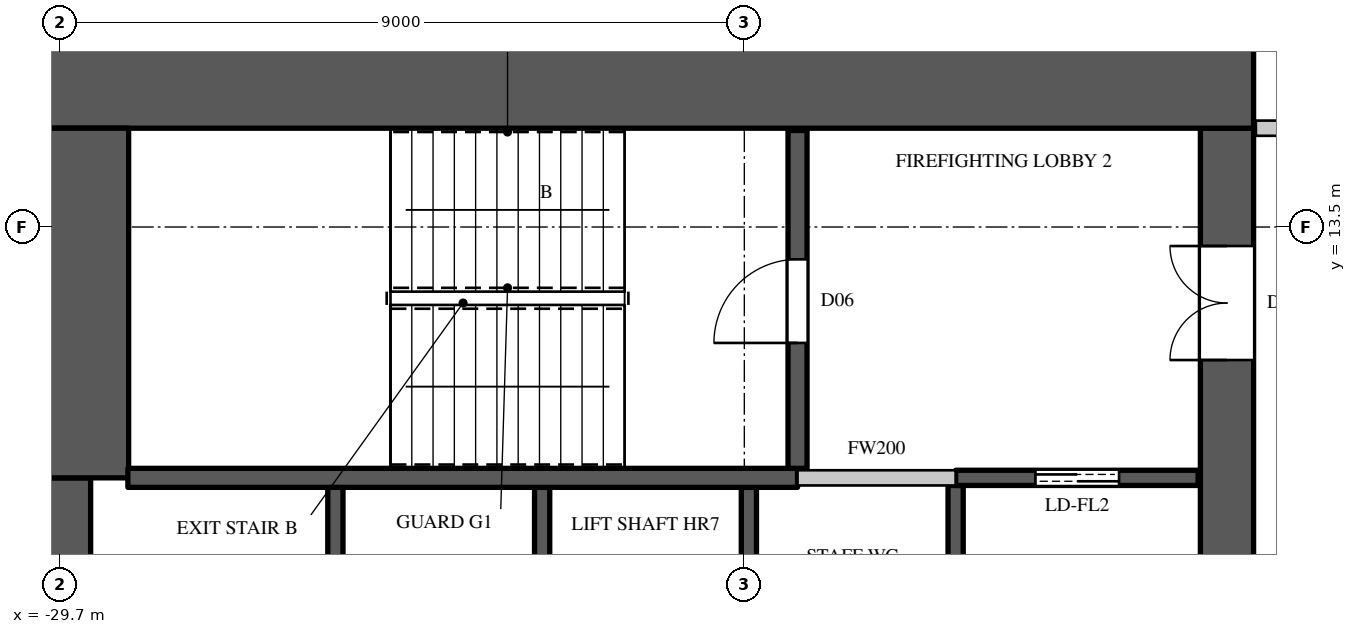
"""IFC4 building model, lengths in metres.
Left out: names, types, materials, properties, quantities, classifications, styles, units other than length and angle.
Written with IfcOpenShell. Run it as: python <this file> out.ifc"""

import sys

from ifc_helpers import new_model, si_unit, direction, frame, frame_2d, origin, place, context, subcontext, project, spatial, rectangle, extrude, element, fill, save


model = new_model("IFC4")
c1 = context("Model", 3, precision=1e-05, world=origin(), true_north=direction((0.0, 1.0)))
c2 = subcontext(c1, "Body", "Model", "MODEL_VIEW")
j1 = project(units=[si_unit("LENGTHUNIT", "METRE"), si_unit("PLANEANGLEUNIT", "RADIAN")], contexts=[c1])
p1 = place(None, origin())
s1 = spatial("IfcSite", under=j1, at=p1, CompositionType="ELEMENT")
p2 = place(p1, origin())
s2 = spatial("IfcBuilding", under=s1, at=p2, CompositionType="ELEMENT")
p3 = place(p2, frame((0.0, 0.0, 296.7)))
s3 = spatial("IfcBuildingStorey", under=s2, at=p3, CompositionType="ELEMENT", Elevation=296.7)
p4 = place(p3, frame((-30.0, 15.4, 0.0), z_axis=(0.0, 0.0, 1.0), x_axis=(1.0, 0.0, 0.0)))
e1 = element("IfcWall", 1, at=p4, inside=s3, PredefinedType="SHEAR", context=c2, shape_type="SweptSolid", body=[
    extrude(rectangle(XDim=16.0, YDim=1.2, at=frame_2d((8.0, 0.0))), origin(), (0.0, 0.0, 1.0), 4.1),
])
p5 = place(p3, frame((-14.35, -14.8, 0.0), z_axis=(0.0, 0.0, 1.0), x_axis=(0.0, 1.0, 0.0)))
e2 = element("IfcWall", 2, at=p5, inside=s3, PredefinedType="SHEAR", context=c2, shape_type="SweptSolid", body=[
    extrude(rectangle(XDim=29.6, YDim=0.7, at=frame_2d((14.8, 0.0))), origin(), (0.0, 0.0, 1.0), 4.1),
])
p6 = place(p5, frame((1.55, 0.0, 0.0)))
e3 = element("IfcOpeningElement", 3, at=p6, cuts=e2, PredefinedType="OPENING", context=c2, shape_type="SweptSolid", body=[
    extrude(rectangle(XDim=1.5, YDim=2.4, at=frame_2d((0.75, 1.2))), frame((0.0, 0.36, 0.0), z_axis=(0.0, -1.0, 0.0), x_axis=(1.0, 0.0, 0.0)), (0.0, 0.0, 1.0), 0.72),
])
p7 = place(p5, frame((26.55, 0.0, 0.0)))
e4 = element("IfcOpeningElement", 4, at=p7, cuts=e2, PredefinedType="OPENING", context=c2, shape_type="SweptSolid", body=[
    extrude(rectangle(XDim=1.5, YDim=2.4, at=frame_2d((0.75, 1.2))), frame((0.0, 0.36, 0.0), z_axis=(0.0, -1.0, 0.0), x_axis=(1.0, 0.0, 0.0)), (0.0, 0.0, 1.0), 0.72),
])
p8 = place(p5, frame((8.45, 0.0, 0.0)))
e5 = element("IfcOpeningElement", 5, at=p8, cuts=e2, PredefinedType="OPENING", context=c2, shape_type="SweptSolid", body=[
    extrude(rectangle(XDim=1.5, YDim=2.4, at=frame_2d((0.75, 1.2))), frame((0.0, 0.36, 0.0), z_axis=(0.0, -1.0, 0.0), x_axis=(1.0, 0.0, 0.0)), (0.0, 0.0, 1.0), 0.72),
])
p9 = place(p5, frame((19.65, 0.0, 0.0)))
e6 = element("IfcOpeningElement", 6, at=p9, cuts=e2, PredefinedType="OPENING", context=c2, shape_type="SweptSolid", body=[
    extrude(rectangle(XDim=1.5, YDim=2.4, at=frame_2d((0.75, 1.2))), frame((0.0, 0.36, 0.0), z_axis=(0.0, -1.0, 0.0), x_axis=(1.0, 0.0, 0.0)), (0.0, 0.0, 1.0), 0.72),
])
p10 = place(p5, frame((14.5, 0.0, 0.0)))
e7 = element("IfcOpeningElement", 7, at=p10, cuts=e2, PredefinedType="OPENING", context=c2, shape_type="SweptSolid", body=[
    extrude(rectangle(XDim=0.6, YDim=2.0, at=frame_2d((0.3, 1.0))), frame((0.0, 0.36, 0.0), z_axis=(0.0, -1.0, 0.0), x_axis=(1.0, 0.0, 0.0)), (0.0, 0.0, 1.0), 0.72),
])
p11 = place(p3, frame((-29.65, -10.2, 0.0), z_axis=(0.0, 0.0, 1.0), x_axis=(0.0, 1.0, 0.0)))
e8 = element("IfcWall", 8, at=p11, inside=s3, PredefinedType="SHEAR", context=c2, shape_type="SweptSolid", body=[
    extrude(rectangle(XDim=20.4, YDim=0.7, at=frame_2d((10.2, 0.0))), origin(), (0.0, 0.0, 1.0), 4.1),
])
p12 = place(p3, frame((-29.4, 10.2, 0.0), z_axis=(0.0, 0.0, 1.0), x_axis=(0.0, 1.0, 0.0)))
e9 = element("IfcWall", 9, at=p12, inside=s3, PredefinedType="SHEAR", context=c2, shape_type="SweptSolid", body=[
    extrude(rectangle(XDim=4.6, YDim=1.2, at=frame_2d((2.3, 0.0))), origin(), (0.0, 0.0, 1.0), 4.1),
])
p13 = place(p3, frame((-20.0, 10.2, 0.0), z_axis=(0.0, 0.0, 1.0), x_axis=(1.0, 0.0, 0.0)))
e10 = element("IfcWall", 10, at=p13, inside=s3, PredefinedType="PARTITIONING", context=c2, shape_type="SweptSolid", body=[
    extrude(rectangle(XDim=2.08, YDim=0.2, at=frame_2d((1.04, 0.0))), origin(), (0.0, 0.0, 1.0), 3.8),
])
p14 = place(p3, frame((-13.97, 14.8, 0.0), z_axis=(0.0, 0.0, 1.0), x_axis=(1.0, 0.0, 0.0)))
e11 = element("IfcWall", 11, at=p14, inside=s3, PredefinedType="PARTITIONING", context=c2, shape_type="SweptSolid", body=[
    extrude(rectangle(XDim=3.07, YDim=0.2, at=frame_2d((1.535, 0.0))), origin(), (0.0, 0.0, 1.0), 3.8),
])
for number, where, z_axis, x_axis in (
    (12, (-26.08, 7.5, 0.0), (0.0, 0.0, 1.0), (0.0, 1.0, 0.0)),
    (13, (-23.36, 7.5, 0.0), (0.0, 0.0, 1.0), (0.0, 1.0, 0.0)),
):
    element("IfcWall", number, at=place(p3, frame(where, z_axis=z_axis, x_axis=x_axis)), inside=s3, PredefinedType="SHEAR", context=c2, shape_type="SweptSolid", body=[
        extrude(rectangle(XDim=2.575, YDim=0.2, at=frame_2d((1.288, 0.0))), origin(), (0.0, 0.0, 1.0), 4.1),
    ])
p15 = place(p3, frame((-20.64, 7.5, 0.0), z_axis=(0.0, 0.0, 1.0), x_axis=(0.0, 1.0, 0.0)))
e14 = element("IfcWall", 14, at=p15, inside=s3, PredefinedType="SHEAR", context=c2, shape_type="SweptSolid", body=[
    extrude(rectangle(XDim=2.575, YDim=0.2, at=frame_2d((1.288, 0.0))), origin(), (0.0, 0.0, 1.0), 3.8),
])
p16 = place(p3, frame((-17.92, 7.5, 0.0), z_axis=(0.0, 0.0, 1.0), x_axis=(0.0, 1.0, 0.0)))
e15 = element("IfcWall", 15, at=p16, inside=s3, PredefinedType="SHEAR", context=c2, shape_type="SweptSolid", body=[
    extrude(rectangle(XDim=2.6, YDim=0.2, at=frame_2d((1.3, 0.0))), origin(), (0.0, 0.0, 1.0), 3.8),
])
p17 = place(p3, frame((-17.92, 10.2, 0.0), z_axis=(0.0, 0.0, 1.0), x_axis=(1.0, 0.0, 0.0)))
e16 = element("IfcWall", 16, at=p17, inside=s3, PredefinedType="SHEAR", context=c2, shape_type="SweptSolid", body=[
    extrude(rectangle(XDim=3.19, YDim=0.2, at=frame_2d((1.595, 0.0))), origin(), (0.0, 0.0, 1.0), 3.8),
])
p18 = place(p17, frame((1.05, 0.0, 0.0)))
e17 = element("IfcOpeningElement", 17, at=p18, cuts=e16, PredefinedType="OPENING", context=c2, shape_type="SweptSolid", body=[
    extrude(rectangle(XDim=1.1, YDim=2.2, at=frame_2d((0.55, 1.1))), frame((0.0, 0.11, 0.0), z_axis=(0.0, -1.0, 0.0), x_axis=(1.0, 0.0, 0.0)), (0.0, 0.0, 1.0), 0.22),
])
p19 = place(p3, frame((-28.81, 10.2, 0.0), z_axis=(0.0, 0.0, 1.0), x_axis=(1.0, 0.0, 0.0)))
e18 = element("IfcWall", 18, at=p19, inside=s3, PredefinedType="SHEAR", context=c2, shape_type="SweptSolid", body=[
    extrude(rectangle(XDim=8.81, YDim=0.25, at=frame_2d((4.405, 0.0))), origin(), (0.0, 0.0, 1.0), 3.8),
])
p20 = place(p3, frame((-20.0, 10.325, 0.0), z_axis=(0.0, 0.0, 1.0), x_axis=(0.0, 1.0, 0.0)))
e19 = element("IfcWall", 19, at=p20, inside=s3, PredefinedType="SHEAR", context=c2, shape_type="SweptSolid", body=[
    extrude(rectangle(XDim=4.445, YDim=0.25, at=frame_2d((2.223, 0.0))), origin(), (0.0, 0.0, 1.0), 3.8),
])
p21 = place(p20, frame((1.65, 0.0, 0.0)))
e20 = element("IfcOpeningElement", 20, at=p21, cuts=e19, PredefinedType="OPENING", context=c2, shape_type="SweptSolid", body=[
    extrude(rectangle(XDim=1.1, YDim=2.2, at=frame_2d((0.55, 1.1))), frame((0.0, 0.135, 0.0), z_axis=(0.0, -1.0, 0.0), x_axis=(1.0, 0.0, 0.0)), (0.0, 0.0, 1.0), 0.27),
])
p22 = place(p21, origin())
e21 = element("IfcDoor", 21, at=p22, inside=s3, OperationType="SINGLE_SWING_LEFT", PredefinedType="DOOR", context=c2, shape_type="SweptSolid", body=[
    extrude(rectangle(XDim=1.1, YDim=2.2, at=frame_2d((0.55, 1.1))), frame((0.0, 0.025, 0.0), z_axis=(0.0, -1.0, 0.0), x_axis=(1.0, 0.0, 0.0)), (0.0, 0.0, 1.0), 0.05),
])
fill(e20, e21)
p23 = place(p18, origin())
e22 = element("IfcDoor", 22, at=p23, inside=s3, OperationType="DOUBLE_DOOR_SLIDING", PredefinedType="DOOR", context=c2, shape_type="SweptSolid", body=[
    extrude(rectangle(XDim=1.1, YDim=2.2, at=frame_2d((0.55, 1.1))), frame((0.0, 0.025, 0.0), z_axis=(0.0, -1.0, 0.0), x_axis=(1.0, 0.0, 0.0)), (0.0, 0.0, 1.0), 0.05),
])
fill(e17, e22)
p24 = place(p7, origin())
e23 = element("IfcDoor", 23, at=p24, inside=s3, OperationType="DOUBLE_DOOR_SINGLE_SWING", PredefinedType="DOOR", context=c2, shape_type="SweptSolid", body=[
    extrude(rectangle(XDim=1.5, YDim=2.4, at=frame_2d((0.75, 1.2))), frame((0.0, 0.345, 0.0), z_axis=(0.0, -1.0, 0.0), x_axis=(1.0, 0.0, 0.0)), (0.0, 0.0, 1.0), 0.05),
])
fill(e4, e23)
save(model, sys.argv[1])
